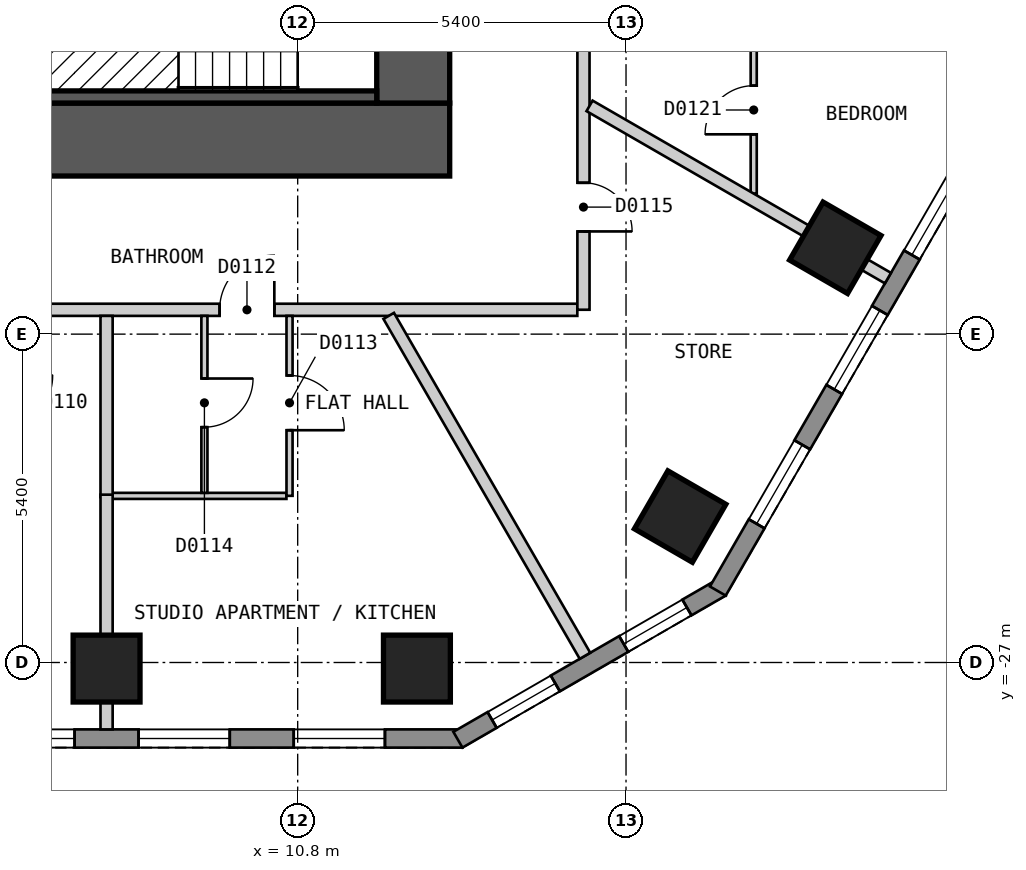
"""IFC4 building model, lengths in metres.
Left out: names, types, materials, properties, quantities, classifications, styles, units other than length and angle.
Written with IfcOpenShell. Run it as: python <this file> out.ifc"""

import sys

from ifc_helpers import new_model, si_unit, direction, frame, frame_2d, origin, origin_2d, place, context, subcontext, project, spatial, polyline, rectangle, outline, extrude, element, fill, save


model = new_model("IFC4")
c1 = context("Model", 3, precision=1e-05, world=origin(), true_north=direction((0.0, 1.0)))
c2 = subcontext(c1, "Body", "Model", "MODEL_VIEW")
j1 = project(units=[si_unit("LENGTHUNIT", "METRE"), si_unit("PLANEANGLEUNIT", "RADIAN")], contexts=[c1])
p1 = place(None, origin())
s1 = spatial("IfcSite", under=j1, at=p1, CompositionType="ELEMENT")
p2 = place(p1, origin())
s2 = spatial("IfcBuilding", under=s1, at=p2, CompositionType="ELEMENT")
p3 = place(p2, frame((0.0, 0.0, 29.4)))
s3 = spatial("IfcBuildingStorey", under=s2, at=p3, CompositionType="ELEMENT", Elevation=29.4)
for number, where, z_axis, x_axis in (
    (1, (7.657, -27.1, 0.0), (0.0, 0.0, 1.0), (1.0, 0.0, 0.0)),
    (2, (12.761, -27.1, 0.0), (0.0, 0.0, 1.0), (1.0, 0.0, 0.0)),
    (3, (17.09, -24.6, 0.0), (0.0, 0.0, 1.0), (0.5, 0.866, 0.0)),
    (4, (19.642, -20.18, 0.0), (0.0, 0.0, 1.0), (0.5, 0.866, 0.0)),
):
    element("IfcColumn", number, at=place(p3, frame(where, z_axis=z_axis, x_axis=x_axis)), inside=s3, PredefinedType="COLUMN", context=c2, shape_type="SweptSolid", body=[
        extrude(rectangle(XDim=1.1, YDim=1.1, at=origin_2d()), origin(), (0.0, 0.0, 1.0), 3.0),
    ])
p4 = place(p3, frame((-13.3, -18.4, 0.0), z_axis=(0.0, 0.0, 1.0), x_axis=(1.0, 0.0, 0.0)))
e5 = element("IfcWall", 5, at=p4, inside=s3, PredefinedType="SHEAR", context=c2, shape_type="SweptSolid", body=[
    extrude(rectangle(XDim=26.6, YDim=1.2, at=frame_2d((13.3, 0.0))), origin(), (0.0, 0.0, 1.0), 2.7),
])
p5 = place(p3, frame((12.7, -17.8, 0.0), z_axis=(0.0, 0.0, 1.0), x_axis=(0.0, 1.0, 0.0)))
e6 = element("IfcWall", 6, at=p5, inside=s3, PredefinedType="SHEAR", context=c2, shape_type="SweptSolid", body=[
    extrude(rectangle(XDim=11.6, YDim=1.2, at=frame_2d((5.8, 0.0))), origin(), (0.0, 0.0, 1.0), 2.7),
])
p6 = place(p3, frame((-13.51, -28.25, 0.0), z_axis=(0.0, 0.0, 1.0), x_axis=(1.0, 0.0, 0.0)))
e7 = element("IfcWall", 7, at=p6, inside=s3, PredefinedType="SOLIDWALL", context=c2, shape_type="SweptSolid", body=[
    extrude(outline(polyline([(0.0, -0.15), (27.02, -0.15), (26.94, 0.15), (0.08, 0.15), (0.0, -0.15)])), origin(), (0.0, 0.0, 1.0), 2.7),
])
p7 = place(p6, frame((1.277, 0.0, 0.15)))
e8 = element("IfcOpeningElement", 8, at=p7, cuts=e7, PredefinedType="OPENING", context=c2, shape_type="SweptSolid", body=[
    extrude(rectangle(XDim=1.5, YDim=2.1, at=frame_2d((0.75, 1.05))), frame((0.0, 0.16, 0.0), z_axis=(0.0, -1.0, 0.0), x_axis=(1.0, 0.0, 0.0)), (0.0, 0.0, 1.0), 0.32),
])
p8 = place(p6, frame((3.829, 0.0, 0.15)))
e9 = element("IfcOpeningElement", 9, at=p8, cuts=e7, PredefinedType="OPENING", context=c2, shape_type="SweptSolid", body=[
    extrude(rectangle(XDim=1.5, YDim=2.1, at=frame_2d((0.75, 1.05))), frame((0.0, 0.16, 0.0), z_axis=(0.0, -1.0, 0.0), x_axis=(1.0, 0.0, 0.0)), (0.0, 0.0, 1.0), 0.32),
])
p9 = place(p6, frame((6.381, 0.0, 0.15)))
e10 = element("IfcOpeningElement", 10, at=p9, cuts=e7, PredefinedType="OPENING", context=c2, shape_type="SweptSolid", body=[
    extrude(rectangle(XDim=1.5, YDim=2.1, at=frame_2d((0.75, 1.05))), frame((0.0, 0.16, 0.0), z_axis=(0.0, -1.0, 0.0), x_axis=(1.0, 0.0, 0.0)), (0.0, 0.0, 1.0), 0.32),
])
p10 = place(p6, frame((8.933, 0.0, 0.15)))
e11 = element("IfcOpeningElement", 11, at=p10, cuts=e7, PredefinedType="OPENING", context=c2, shape_type="SweptSolid", body=[
    extrude(rectangle(XDim=1.5, YDim=2.1, at=frame_2d((0.75, 1.05))), frame((0.0, 0.16, 0.0), z_axis=(0.0, -1.0, 0.0), x_axis=(1.0, 0.0, 0.0)), (0.0, 0.0, 1.0), 0.32),
])
p11 = place(p6, frame((11.485, 0.0, 0.15)))
e12 = element("IfcOpeningElement", 12, at=p11, cuts=e7, PredefinedType="OPENING", context=c2, shape_type="SweptSolid", body=[
    extrude(rectangle(XDim=1.5, YDim=2.1, at=frame_2d((0.75, 1.05))), frame((0.0, 0.16, 0.0), z_axis=(0.0, -1.0, 0.0), x_axis=(1.0, 0.0, 0.0)), (0.0, 0.0, 1.0), 0.32),
])
p12 = place(p6, frame((14.037, 0.0, 0.15)))
e13 = element("IfcOpeningElement", 13, at=p12, cuts=e7, PredefinedType="OPENING", context=c2, shape_type="SweptSolid", body=[
    extrude(rectangle(XDim=1.5, YDim=2.1, at=frame_2d((0.75, 1.05))), frame((0.0, 0.16, 0.0), z_axis=(0.0, -1.0, 0.0), x_axis=(1.0, 0.0, 0.0)), (0.0, 0.0, 1.0), 0.32),
])
p13 = place(p6, frame((16.589, 0.0, 0.15)))
e14 = element("IfcOpeningElement", 14, at=p13, cuts=e7, PredefinedType="OPENING", context=c2, shape_type="SweptSolid", body=[
    extrude(rectangle(XDim=1.5, YDim=2.1, at=frame_2d((0.75, 1.05))), frame((0.0, 0.16, 0.0), z_axis=(0.0, -1.0, 0.0), x_axis=(1.0, 0.0, 0.0)), (0.0, 0.0, 1.0), 0.32),
])
p14 = place(p6, frame((19.141, 0.0, 0.15)))
e15 = element("IfcOpeningElement", 15, at=p14, cuts=e7, PredefinedType="OPENING", context=c2, shape_type="SweptSolid", body=[
    extrude(rectangle(XDim=1.5, YDim=2.1, at=frame_2d((0.75, 1.05))), frame((0.0, 0.16, 0.0), z_axis=(0.0, -1.0, 0.0), x_axis=(1.0, 0.0, 0.0)), (0.0, 0.0, 1.0), 0.32),
])
p15 = place(p6, frame((21.693, 0.0, 0.15)))
e16 = element("IfcOpeningElement", 16, at=p15, cuts=e7, PredefinedType="OPENING", context=c2, shape_type="SweptSolid", body=[
    extrude(rectangle(XDim=1.5, YDim=2.1, at=frame_2d((0.75, 1.05))), frame((0.0, 0.16, 0.0), z_axis=(0.0, -1.0, 0.0), x_axis=(1.0, 0.0, 0.0)), (0.0, 0.0, 1.0), 0.32),
])
p16 = place(p6, frame((24.245, 0.0, 0.15)))
e17 = element("IfcOpeningElement", 17, at=p16, cuts=e7, PredefinedType="OPENING", context=c2, shape_type="SweptSolid", body=[
    extrude(rectangle(XDim=1.5, YDim=2.1, at=frame_2d((0.75, 1.05))), frame((0.0, 0.16, 0.0), z_axis=(0.0, -1.0, 0.0), x_axis=(1.0, 0.0, 0.0)), (0.0, 0.0, 1.0), 0.32),
])
p17 = place(p3, frame((13.435, -28.27, 0.0), z_axis=(0.0, 0.0, 1.0), x_axis=(0.866010750942, 0.50002537861, 0.0)))
e18 = element("IfcWall", 18, at=p17, inside=s3, PredefinedType="SOLIDWALL", context=c2, shape_type="SweptSolid", body=[
    extrude(outline(polyline([(0.0, -0.15), (5.0, -0.15), (4.919, 0.15), (0.08, 0.15), (0.0, -0.15)])), origin(), (0.0, 0.0, 1.0), 2.7),
])
p18 = place(p17, frame((0.65, 0.0, 0.15)))
e19 = element("IfcOpeningElement", 19, at=p18, cuts=e18, PredefinedType="OPENING", context=c2, shape_type="SweptSolid", body=[
    extrude(rectangle(XDim=1.2, YDim=2.1, at=frame_2d((0.6, 1.05))), frame((0.0, 0.16, 0.0), z_axis=(0.0, -1.0, 0.0), x_axis=(1.0, 0.0, 0.0)), (0.0, 0.0, 1.0), 0.32),
])
p19 = place(p17, frame((3.149, 0.0, 0.15)))
e20 = element("IfcOpeningElement", 20, at=p19, cuts=e18, PredefinedType="OPENING", context=c2, shape_type="SweptSolid", body=[
    extrude(rectangle(XDim=1.2, YDim=2.1, at=frame_2d((0.6, 1.05))), frame((0.0, 0.16, 0.0), z_axis=(0.0, -1.0, 0.0), x_axis=(1.0, 0.0, 0.0)), (0.0, 0.0, 1.0), 0.32),
])
p20 = place(p3, frame((17.71, -25.825, 0.0), z_axis=(0.0, 0.0, 1.0), x_axis=(0.500001938803, 0.866024284413, 0.0)))
e21 = element("IfcWall", 21, at=p20, inside=s3, PredefinedType="SOLIDWALL", context=c2, shape_type="SweptSolid", body=[
    extrude(outline(polyline([(0.0, -0.15), (27.02, -0.15), (26.94, 0.15), (0.08, 0.15), (0.0, -0.15)])), origin(), (0.0, 0.0, 1.0), 2.7),
])
p21 = place(p20, frame((1.277, 0.0, 0.15)))
e22 = element("IfcOpeningElement", 22, at=p21, cuts=e21, PredefinedType="OPENING", context=c2, shape_type="SweptSolid", body=[
    extrude(rectangle(XDim=1.5, YDim=2.1, at=frame_2d((0.75, 1.05))), frame((0.0, 0.16, 0.0), z_axis=(0.0, -1.0, 0.0), x_axis=(1.0, 0.0, 0.0)), (0.0, 0.0, 1.0), 0.32),
])
p22 = place(p20, frame((3.829, 0.0, 0.15)))
e23 = element("IfcOpeningElement", 23, at=p22, cuts=e21, PredefinedType="OPENING", context=c2, shape_type="SweptSolid", body=[
    extrude(rectangle(XDim=1.5, YDim=2.1, at=frame_2d((0.75, 1.05))), frame((0.0, 0.16, 0.0), z_axis=(0.0, -1.0, 0.0), x_axis=(1.0, 0.0, 0.0)), (0.0, 0.0, 1.0), 0.32),
])
p23 = place(p20, frame((6.382, 0.0, 0.15)))
e24 = element("IfcOpeningElement", 24, at=p23, cuts=e21, PredefinedType="OPENING", context=c2, shape_type="SweptSolid", body=[
    extrude(rectangle(XDim=1.5, YDim=2.1, at=frame_2d((0.75, 1.05))), frame((0.0, 0.16, 0.0), z_axis=(0.0, -1.0, 0.0), x_axis=(1.0, 0.0, 0.0)), (0.0, 0.0, 1.0), 0.32),
])
p24 = place(p20, frame((8.933, 0.0, 0.15)))
e25 = element("IfcOpeningElement", 25, at=p24, cuts=e21, PredefinedType="OPENING", context=c2, shape_type="SweptSolid", body=[
    extrude(rectangle(XDim=1.5, YDim=2.1, at=frame_2d((0.75, 1.05))), frame((0.0, 0.16, 0.0), z_axis=(0.0, -1.0, 0.0), x_axis=(1.0, 0.0, 0.0)), (0.0, 0.0, 1.0), 0.32),
])
p25 = place(p20, frame((11.485, 0.0, 0.15)))
e26 = element("IfcOpeningElement", 26, at=p25, cuts=e21, PredefinedType="OPENING", context=c2, shape_type="SweptSolid", body=[
    extrude(rectangle(XDim=1.5, YDim=2.1, at=frame_2d((0.75, 1.05))), frame((0.0, 0.16, 0.0), z_axis=(0.0, -1.0, 0.0), x_axis=(1.0, 0.0, 0.0)), (0.0, 0.0, 1.0), 0.32),
])
p26 = place(p20, frame((14.037, 0.0, 0.15)))
e27 = element("IfcOpeningElement", 27, at=p26, cuts=e21, PredefinedType="OPENING", context=c2, shape_type="SweptSolid", body=[
    extrude(rectangle(XDim=1.5, YDim=2.1, at=frame_2d((0.75, 1.05))), frame((0.0, 0.16, 0.0), z_axis=(0.0, -1.0, 0.0), x_axis=(1.0, 0.0, 0.0)), (0.0, 0.0, 1.0), 0.32),
])
p27 = place(p20, frame((16.589, 0.0, 0.15)))
e28 = element("IfcOpeningElement", 28, at=p27, cuts=e21, PredefinedType="OPENING", context=c2, shape_type="SweptSolid", body=[
    extrude(rectangle(XDim=1.5, YDim=2.1, at=frame_2d((0.75, 1.05))), frame((0.0, 0.16, 0.0), z_axis=(0.0, -1.0, 0.0), x_axis=(1.0, 0.0, 0.0)), (0.0, 0.0, 1.0), 0.32),
])
p28 = place(p20, frame((19.141, 0.0, 0.15)))
e29 = element("IfcOpeningElement", 29, at=p28, cuts=e21, PredefinedType="OPENING", context=c2, shape_type="SweptSolid", body=[
    extrude(rectangle(XDim=1.5, YDim=2.1, at=frame_2d((0.75, 1.05))), frame((0.0, 0.16, 0.0), z_axis=(0.0, -1.0, 0.0), x_axis=(1.0, 0.0, 0.0)), (0.0, 0.0, 1.0), 0.32),
])
p29 = place(p20, frame((21.693, 0.0, 0.15)))
e30 = element("IfcOpeningElement", 30, at=p29, cuts=e21, PredefinedType="OPENING", context=c2, shape_type="SweptSolid", body=[
    extrude(rectangle(XDim=1.5, YDim=2.1, at=frame_2d((0.75, 1.05))), frame((0.0, 0.16, 0.0), z_axis=(0.0, -1.0, 0.0), x_axis=(1.0, 0.0, 0.0)), (0.0, 0.0, 1.0), 0.32),
])
p30 = place(p20, frame((24.244, 0.0, 0.15)))
e31 = element("IfcOpeningElement", 31, at=p30, cuts=e21, PredefinedType="OPENING", context=c2, shape_type="SweptSolid", body=[
    extrude(rectangle(XDim=1.5, YDim=2.1, at=frame_2d((0.75, 1.05))), frame((0.0, 0.16, 0.0), z_axis=(0.0, -1.0, 0.0), x_axis=(1.0, 0.0, 0.0)), (0.0, 0.0, 1.0), 0.32),
])
p31 = place(p3, frame((-15.4, -21.2, 0.0), z_axis=(0.0, 0.0, 1.0), x_axis=(1.0, 0.0, 0.0)))
e32 = element("IfcWall", 32, at=p31, inside=s3, PredefinedType="PARTITIONING", context=c2, shape_type="SweptSolid", body=[
    extrude(rectangle(XDim=30.799, YDim=0.2, at=frame_2d((15.399, 0.0))), origin(), (0.0, 0.0, 1.0), 2.7),
])
p32 = place(p31, frame((4.985, 0.0, 0.0)))
e33 = element("IfcOpeningElement", 33, at=p32, cuts=e32, PredefinedType="OPENING", context=c2, shape_type="SweptSolid", body=[
    extrude(rectangle(XDim=0.9, YDim=2.1, at=frame_2d((0.45, 1.05))), frame((0.0, 0.11, 0.0), z_axis=(0.0, -1.0, 0.0), x_axis=(1.0, 0.0, 0.0)), (0.0, 0.0, 1.0), 0.22),
])
p33 = place(p31, frame((14.901, 0.0, 0.0)))
e34 = element("IfcOpeningElement", 34, at=p33, cuts=e32, PredefinedType="OPENING", context=c2, shape_type="SweptSolid", body=[
    extrude(rectangle(XDim=1.0, YDim=2.1, at=frame_2d((0.5, 1.05))), frame((0.0, 0.11, 0.0), z_axis=(0.0, -1.0, 0.0), x_axis=(1.0, 0.0, 0.0)), (0.0, 0.0, 1.0), 0.22),
])
p34 = place(p31, frame((20.005, 0.0, 0.0)))
e35 = element("IfcOpeningElement", 35, at=p34, cuts=e32, PredefinedType="OPENING", context=c2, shape_type="SweptSolid", body=[
    extrude(rectangle(XDim=1.0, YDim=2.1, at=frame_2d((0.5, 1.05))), frame((0.0, 0.11, 0.0), z_axis=(0.0, -1.0, 0.0), x_axis=(1.0, 0.0, 0.0)), (0.0, 0.0, 1.0), 0.22),
])
p35 = place(p31, frame((24.916, 0.0, 0.0)))
e36 = element("IfcOpeningElement", 36, at=p35, cuts=e32, PredefinedType="OPENING", context=c2, shape_type="SweptSolid", body=[
    extrude(rectangle(XDim=0.9, YDim=2.1, at=frame_2d((0.45, 1.05))), frame((0.0, 0.11, 0.0), z_axis=(0.0, -1.0, 0.0), x_axis=(1.0, 0.0, 0.0)), (0.0, 0.0, 1.0), 0.22),
])
p36 = place(p3, frame((15.5, -21.199, 0.0), z_axis=(0.0, 0.0, 1.0), x_axis=(0.0, 1.0, 0.0)))
e37 = element("IfcWall", 37, at=p36, inside=s3, PredefinedType="PARTITIONING", context=c2, shape_type="SweptSolid", body=[
    extrude(rectangle(XDim=7.575, YDim=0.2, at=frame_2d((3.788, 0.0))), origin(), (0.0, 0.0, 1.0), 2.7),
])
p37 = place(p36, frame((1.288, 0.0, 0.0)))
e38 = element("IfcOpeningElement", 38, at=p37, cuts=e37, PredefinedType="OPENING", context=c2, shape_type="SweptSolid", body=[
    extrude(rectangle(XDim=0.8, YDim=2.1, at=frame_2d((0.4, 1.05))), frame((0.0, 0.11, 0.0), z_axis=(0.0, -1.0, 0.0), x_axis=(1.0, 0.0, 0.0)), (0.0, 0.0, 1.0), 0.22),
])
p38 = place(p3, frame((7.757, -24.26, 0.0), z_axis=(0.0, 0.0, 1.0), x_axis=(1.0, 0.0, 0.0)))
e39 = element("IfcWall", 39, at=p38, inside=s3, PredefinedType="PARTITIONING", context=c2, shape_type="SweptSolid", body=[
    extrude(rectangle(XDim=2.858, YDim=0.1, at=frame_2d((1.429, 0.0))), origin(), (0.0, 0.0, 1.0), 2.7),
])
p39 = place(p3, frame((9.266, -24.21, 0.0), z_axis=(0.0, 0.0, 1.0), x_axis=(0.0, 1.0, 0.0)))
e40 = element("IfcWall", 40, at=p39, inside=s3, PredefinedType="PARTITIONING", context=c2, shape_type="SweptSolid", body=[
    extrude(rectangle(XDim=2.91, YDim=0.1, at=frame_2d((1.455, 0.0))), origin(), (0.0, 0.0, 1.0), 2.7),
])
p40 = place(p39, frame((1.08, 0.0, 0.0)))
e41 = element("IfcOpeningElement", 41, at=p40, cuts=e40, PredefinedType="OPENING", context=c2, shape_type="SweptSolid", body=[
    extrude(rectangle(XDim=0.8, YDim=2.1, at=frame_2d((0.4, 1.05))), frame((0.0, 0.06, 0.0), z_axis=(0.0, -1.0, 0.0), x_axis=(1.0, 0.0, 0.0)), (0.0, 0.0, 1.0), 0.12),
])
p41 = place(p3, frame((10.666, -24.259, 0.0), z_axis=(0.0, 0.0, 1.0), x_axis=(0.0, 1.0, 0.0)))
e42 = element("IfcWall", 42, at=p41, inside=s3, PredefinedType="PARTITIONING", context=c2, shape_type="SweptSolid", body=[
    extrude(rectangle(XDim=2.959, YDim=0.1, at=frame_2d((1.479, 0.0))), origin(), (0.0, 0.0, 1.0), 2.7),
])
p42 = place(p41, frame((1.079, 0.0, 0.0)))
e43 = element("IfcOpeningElement", 43, at=p42, cuts=e42, PredefinedType="OPENING", context=c2, shape_type="SweptSolid", body=[
    extrude(rectangle(XDim=0.9, YDim=2.1, at=frame_2d((0.45, 1.05))), frame((0.0, 0.06, 0.0), z_axis=(0.0, -1.0, 0.0), x_axis=(1.0, 0.0, 0.0)), (0.0, 0.0, 1.0), 0.12),
])
p43 = place(p3, frame((18.3, -19.289, 0.0), z_axis=(0.0, 0.0, 1.0), x_axis=(0.0, 1.0, 0.0)))
e44 = element("IfcWall", 44, at=p43, inside=s3, PredefinedType="PARTITIONING", context=c2, shape_type="SweptSolid", body=[
    extrude(rectangle(XDim=2.865, YDim=0.1, at=frame_2d((1.433, 0.0))), origin(), (0.0, 0.0, 1.0), 2.7),
])
p44 = place(p43, frame((0.975, 0.0, 0.0)))
e45 = element("IfcOpeningElement", 45, at=p44, cuts=e44, PredefinedType="OPENING", context=c2, shape_type="SweptSolid", body=[
    extrude(rectangle(XDim=0.8, YDim=2.1, at=frame_2d((0.4, 1.05))), frame((0.0, 0.06, 0.0), z_axis=(0.0, -1.0, 0.0), x_axis=(1.0, 0.0, 0.0)), (0.0, 0.0, 1.0), 0.12),
])
p45 = place(p3, frame((12.297, -21.3, 0.0), z_axis=(0.0, 0.0, 1.0), x_axis=(0.500056399578, -0.865992839024, 0.0)))
e46 = element("IfcWall", 46, at=p45, inside=s3, PredefinedType="PARTITIONING", context=c2, shape_type="SweptSolid", body=[
    extrude(rectangle(XDim=6.455, YDim=0.2, at=frame_2d((3.228, 0.0))), origin(), (0.0, 0.0, 1.0), 2.7),
])
p46 = place(p3, frame((7.657, -21.3, 0.0), z_axis=(0.0, 0.0, 1.0), x_axis=(0.0, -1.0, 0.0)))
e47 = element("IfcWall", 47, at=p46, inside=s3, PredefinedType="PARTITIONING", context=c2, shape_type="SweptSolid", body=[
    extrude(rectangle(XDim=2.98, YDim=0.2, at=frame_2d((1.49, 0.0))), origin(), (0.0, 0.0, 1.0), 2.7),
])
p47 = place(p3, frame((15.6, -17.846, 0.0), z_axis=(0.0, 0.0, 1.0), x_axis=(0.866071523686, -0.499920109479, 0.0)))
e48 = element("IfcWall", 48, at=p47, inside=s3, PredefinedType="PARTITIONING", context=c2, shape_type="SweptSolid", body=[
    extrude(rectangle(XDim=5.667, YDim=0.2, at=frame_2d((2.833, 0.0))), origin(), (0.0, 0.0, 1.0), 2.7),
])
p48 = place(p3, frame((7.657, -28.1, 0.0), z_axis=(0.0, 0.0, 1.0), x_axis=(0.0, 1.0, 0.0)))
e49 = element("IfcWall", 49, at=p48, inside=s3, PredefinedType="PARTITIONING", context=c2, shape_type="SweptSolid", body=[
    extrude(rectangle(XDim=3.86, YDim=0.2, at=frame_2d((1.93, 0.0))), origin(), (0.0, 0.0, 1.0), 2.7),
])
p49 = place(p3, frame((6.7, -17.7, 0.0), z_axis=(0.0, 0.0, 1.0), x_axis=(1.0, 0.0, 0.0)))
e50 = element("IfcWall", 50, at=p49, inside=s3, PredefinedType="SOLIDWALL", context=c2, shape_type="SweptSolid", body=[
    extrude(rectangle(XDim=5.4, YDim=0.2, at=frame_2d((2.7, 0.0))), origin(), (0.0, 0.0, 1.0), 2.7),
])
p50 = place(p14, origin())
e51 = element("IfcWindow", 51, at=p50, inside=s3, PartitioningType="SINGLE_PANEL", PredefinedType="WINDOW", context=c2, shape_type="SweptSolid", body=[
    extrude(rectangle(XDim=1.5, YDim=2.1, at=frame_2d((0.75, 1.05))), frame((0.0, 0.03, 0.0), z_axis=(0.0, -1.0, 0.0), x_axis=(1.0, 0.0, 0.0)), (0.0, 0.0, 1.0), 0.06),
])
fill(e15, e51)
p51 = place(p15, origin())
e52 = element("IfcWindow", 52, at=p51, inside=s3, PartitioningType="SINGLE_PANEL", PredefinedType="WINDOW", context=c2, shape_type="SweptSolid", body=[
    extrude(rectangle(XDim=1.5, YDim=2.1, at=frame_2d((0.75, 1.05))), frame((0.0, 0.03, 0.0), z_axis=(0.0, -1.0, 0.0), x_axis=(1.0, 0.0, 0.0)), (0.0, 0.0, 1.0), 0.06),
])
fill(e16, e52)
p52 = place(p16, origin())
e53 = element("IfcWindow", 53, at=p52, inside=s3, PartitioningType="SINGLE_PANEL", PredefinedType="WINDOW", context=c2, shape_type="SweptSolid", body=[
    extrude(rectangle(XDim=1.5, YDim=2.1, at=frame_2d((0.75, 1.05))), frame((0.0, 0.03, 0.0), z_axis=(0.0, -1.0, 0.0), x_axis=(1.0, 0.0, 0.0)), (0.0, 0.0, 1.0), 0.06),
])
fill(e17, e53)
p53 = place(p18, origin())
e54 = element("IfcWindow", 54, at=p53, inside=s3, PartitioningType="SINGLE_PANEL", PredefinedType="WINDOW", context=c2, shape_type="SweptSolid", body=[
    extrude(rectangle(XDim=1.2, YDim=2.1, at=frame_2d((0.6, 1.05))), frame((0.0, 0.03, 0.0), z_axis=(0.0, -1.0, 0.0), x_axis=(1.0, 0.0, 0.0)), (0.0, 0.0, 1.0), 0.06),
])
fill(e19, e54)
p54 = place(p19, origin())
e55 = element("IfcWindow", 55, at=p54, inside=s3, PartitioningType="SINGLE_PANEL", PredefinedType="WINDOW", context=c2, shape_type="SweptSolid", body=[
    extrude(rectangle(XDim=1.2, YDim=2.1, at=frame_2d((0.6, 1.05))), frame((0.0, 0.03, 0.0), z_axis=(0.0, -1.0, 0.0), x_axis=(1.0, 0.0, 0.0)), (0.0, 0.0, 1.0), 0.06),
])
fill(e20, e55)
p55 = place(p21, origin())
e56 = element("IfcWindow", 56, at=p55, inside=s3, PartitioningType="SINGLE_PANEL", PredefinedType="WINDOW", context=c2, shape_type="SweptSolid", body=[
    extrude(rectangle(XDim=1.5, YDim=2.1, at=frame_2d((0.75, 1.05))), frame((0.0, 0.03, 0.0), z_axis=(0.0, -1.0, 0.0), x_axis=(1.0, 0.0, 0.0)), (0.0, 0.0, 1.0), 0.06),
])
fill(e22, e56)
p56 = place(p22, origin())
e57 = element("IfcWindow", 57, at=p56, inside=s3, PartitioningType="SINGLE_PANEL", PredefinedType="WINDOW", context=c2, shape_type="SweptSolid", body=[
    extrude(rectangle(XDim=1.5, YDim=2.1, at=frame_2d((0.75, 1.05))), frame((0.0, 0.03, 0.0), z_axis=(0.0, -1.0, 0.0), x_axis=(1.0, 0.0, 0.0)), (0.0, 0.0, 1.0), 0.06),
])
fill(e23, e57)
p57 = place(p23, origin())
e58 = element("IfcWindow", 58, at=p57, inside=s3, PartitioningType="SINGLE_PANEL", PredefinedType="WINDOW", context=c2, shape_type="SweptSolid", body=[
    extrude(rectangle(XDim=1.5, YDim=2.1, at=frame_2d((0.75, 1.05))), frame((0.0, 0.03, 0.0), z_axis=(0.0, -1.0, 0.0), x_axis=(1.0, 0.0, 0.0)), (0.0, 0.0, 1.0), 0.06),
])
fill(e24, e58)
p58 = place(p35, origin())
e59 = element("IfcDoor", 59, at=p58, inside=s3, OperationType="SINGLE_SWING_RIGHT", PredefinedType="DOOR", context=c2, shape_type="SweptSolid", body=[
    extrude(rectangle(XDim=0.9, YDim=2.1, at=frame_2d((0.45, 1.05))), frame((0.0, 0.025, 0.0), z_axis=(0.0, -1.0, 0.0), x_axis=(1.0, 0.0, 0.0)), (0.0, 0.0, 1.0), 0.05),
])
fill(e36, e59)
p59 = place(p42, origin())
e60 = element("IfcDoor", 60, at=p59, inside=s3, OperationType="SINGLE_SWING_LEFT", PredefinedType="DOOR", context=c2, shape_type="SweptSolid", body=[
    extrude(rectangle(XDim=0.9, YDim=2.1, at=frame_2d((0.45, 1.05))), frame((0.0, 0.025, 0.0), z_axis=(0.0, -1.0, 0.0), x_axis=(1.0, 0.0, 0.0)), (0.0, 0.0, 1.0), 0.05),
])
fill(e43, e60)
p60 = place(p40, origin())
e61 = element("IfcDoor", 61, at=p60, inside=s3, OperationType="SINGLE_SWING_RIGHT", PredefinedType="DOOR", context=c2, shape_type="SweptSolid", body=[
    extrude(rectangle(XDim=0.8, YDim=2.1, at=frame_2d((0.4, 1.05))), frame((0.0, 0.025, 0.0), z_axis=(0.0, -1.0, 0.0), x_axis=(1.0, 0.0, 0.0)), (0.0, 0.0, 1.0), 0.05),
])
fill(e41, e61)
p61 = place(p37, origin())
e62 = element("IfcDoor", 62, at=p61, inside=s3, OperationType="SINGLE_SWING_LEFT", PredefinedType="DOOR", context=c2, shape_type="SweptSolid", body=[
    extrude(rectangle(XDim=0.8, YDim=2.1, at=frame_2d((0.4, 1.05))), frame((0.0, 0.025, 0.0), z_axis=(0.0, -1.0, 0.0), x_axis=(1.0, 0.0, 0.0)), (0.0, 0.0, 1.0), 0.05),
])
fill(e38, e62)
p62 = place(p44, origin())
e63 = element("IfcDoor", 63, at=p62, inside=s3, OperationType="SINGLE_SWING_LEFT", PredefinedType="DOOR", context=c2, shape_type="SweptSolid", body=[
    extrude(rectangle(XDim=0.8, YDim=2.1, at=frame_2d((0.4, 1.05))), frame((0.0, 0.025, 0.0), z_axis=(0.0, -1.0, 0.0), x_axis=(1.0, 0.0, 0.0)), (0.0, 0.0, 1.0), 0.05),
])
fill(e45, e63)
save(model, sys.argv[1])
